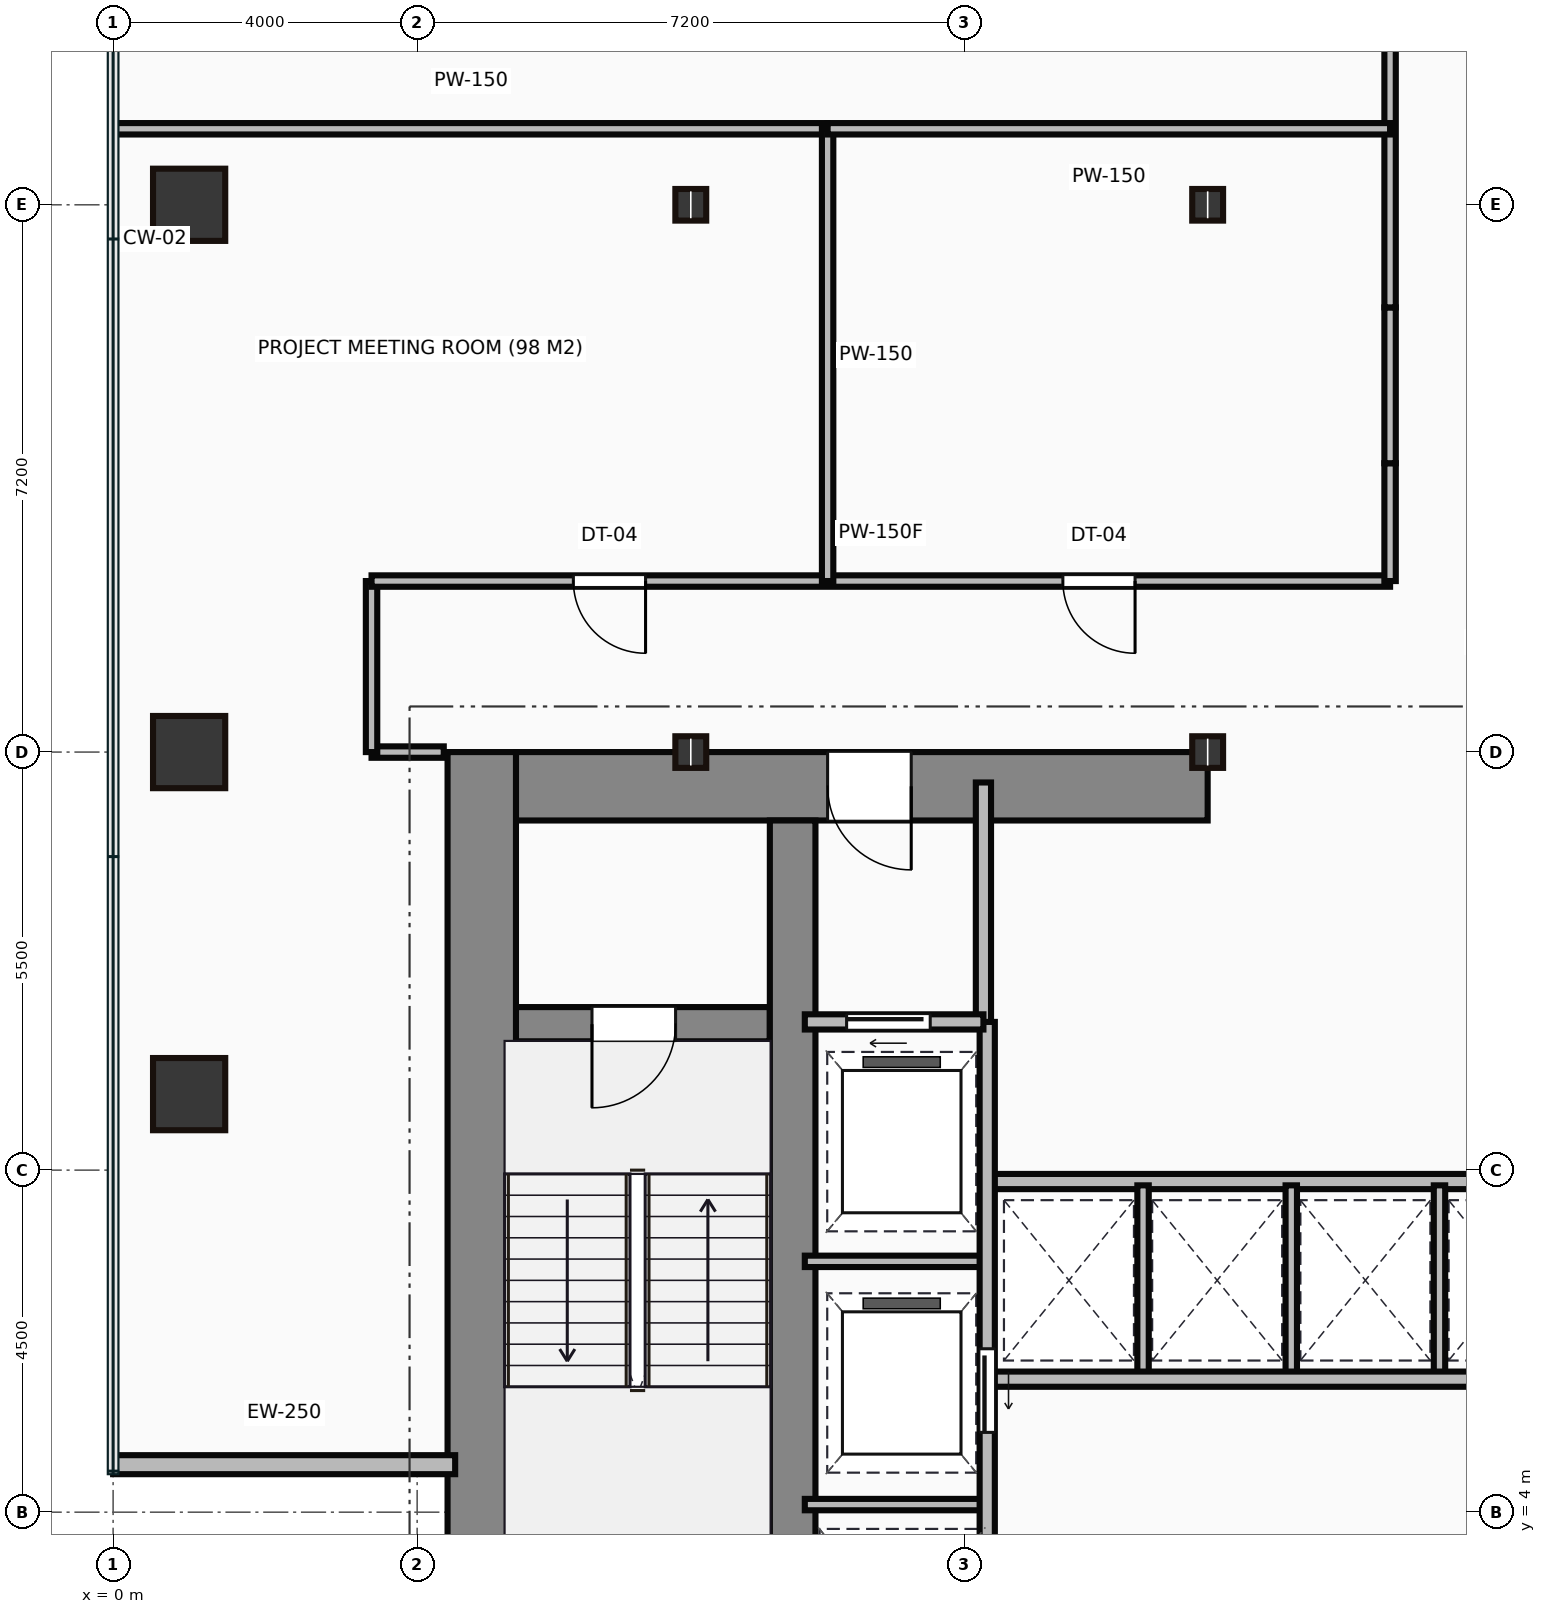
"""IFC4 building model, lengths in metres.
Left out: names, types, materials, properties, quantities, classifications, styles, units other than length and angle.
Written with IfcOpenShell. Run it as: python <this file> out.ifc"""

import sys

from ifc_helpers import new_model, si_unit, direction, frame, frame_2d, origin, origin_2d, place, context, subcontext, project, spatial, rectangle, hollow_rectangle, i_section, extrude, source, transform, mapped, element, fill, save


model = new_model("IFC4")
c1 = context("Model", 3, precision=1e-05, world=origin(), true_north=direction((0.0, 1.0)))
c2 = subcontext(c1, "Body", "Model", "MODEL_VIEW")
j1 = project(units=[si_unit("LENGTHUNIT", "METRE"), si_unit("PLANEANGLEUNIT", "RADIAN")], contexts=[c1])
p1 = place(None, origin())
s1 = spatial("IfcSite", under=j1, at=p1, CompositionType="ELEMENT")
p2 = place(p1, origin())
s2 = spatial("IfcBuilding", under=s1, at=p2, CompositionType="ELEMENT")
p3 = place(p2, frame((0.0, 0.0, 39.8)))
s3 = spatial("IfcBuildingStorey", under=s2, at=p3, CompositionType="ELEMENT", Elevation=39.8)
m1 = source(origin(), c2, "Body", "SweptSolid", [
    extrude(rectangle(XDim=13.1, YDim=0.9, at=frame_2d((6.55, 0.0))), origin(), (0.0, 0.0, 1.0), 3.65),
])
p4 = place(p3, frame((4.85, 0.9, 0.0), z_axis=(0.0, 0.0, 1.0), x_axis=(0.0, 1.0, 0.0)))
e1 = element("IfcWall", 1, at=p4, inside=s3, PredefinedType="SHEAR", context=c2, shape_type="MappedRepresentation", body=[
    mapped(m1, transform((0.0, 0.0, 0.0))),
])
m2 = source(origin(), c2, "Body", "SweptSolid", [
    extrude(rectangle(XDim=9.1, YDim=0.9, at=frame_2d((4.55, 0.0))), origin(), (0.0, 0.0, 1.0), 3.65),
])
p5 = place(p3, frame((5.3, 13.55, 0.0), z_axis=(0.0, 0.0, 1.0), x_axis=(1.0, 0.0, 0.0)))
e2 = element("IfcWall", 2, at=p5, inside=s3, PredefinedType="SHEAR", context=c2, shape_type="MappedRepresentation", body=[
    mapped(m2, transform((0.0, 0.0, 0.0))),
])
p6 = place(p5, frame((4.1, 0.0, 0.0)))
e3 = element("IfcOpeningElement", 3, at=p6, cuts=e2, PredefinedType="OPENING", context=c2, shape_type="SweptSolid", body=[
    extrude(rectangle(XDim=1.1, YDim=2.15, at=frame_2d((0.55, 1.075))), frame((0.0, 0.46, 0.0), z_axis=(0.0, -1.0, 0.0), x_axis=(1.0, 0.0, 0.0)), (0.0, 0.0, 1.0), 0.92),
])
m3 = source(origin(), c2, "Body", "SweptSolid", [
    extrude(rectangle(XDim=12.2, YDim=0.6, at=frame_2d((6.1, 0.0))), origin(), (0.0, 0.0, 1.0), 3.65),
])
p7 = place(p3, frame((8.94, 0.9, 0.0), z_axis=(0.0, 0.0, 1.0), x_axis=(0.0, 1.0, 0.0)))
e4 = element("IfcWall", 4, at=p7, inside=s3, PredefinedType="SHEAR", context=c2, shape_type="MappedRepresentation", body=[
    mapped(m3, transform((0.0, 0.0, 0.0))),
])
m4 = source(origin(), c2, "Body", "SweptSolid", [
    extrude(rectangle(XDim=3.39, YDim=0.45, at=frame_2d((1.695, 0.0))), origin(), (0.0, 0.0, 1.0), 3.65),
])
p8 = place(p3, frame((5.25, 10.42, 0.0), z_axis=(0.0, 0.0, 1.0), x_axis=(1.0, 0.0, 0.0)))
e5 = element("IfcWall", 5, at=p8, inside=s3, PredefinedType="SHEAR", context=c2, shape_type="MappedRepresentation", body=[
    mapped(m4, transform((0.0, 0.0, 0.0))),
])
p9 = place(p8, frame((1.05, 0.0, 0.0)))
e6 = element("IfcOpeningElement", 6, at=p9, cuts=e5, PredefinedType="OPENING", context=c2, shape_type="SweptSolid", body=[
    extrude(rectangle(XDim=1.1, YDim=2.15, at=frame_2d((0.55, 1.075))), frame((0.0, 0.235, 0.0), z_axis=(0.0, -1.0, 0.0), x_axis=(1.0, 0.0, 0.0)), (0.0, 0.0, 1.0), 0.47),
])
m5 = source(origin(), c2, "Body", "SweptSolid", [
    extrude(hollow_rectangle(XDim=0.95, YDim=0.95, WallThickness=0.045, at=origin_2d()), origin(), (0.0, 0.0, 1.0), 3.65),
])
for number, where, z_axis, x_axis in (
    (7, (1.0, 9.5, 0.0), (0.0, 0.0, 1.0), (1.0, 0.0, 0.0)),
    (8, (1.0, 14.0, 0.0), (0.0, 0.0, 1.0), (1.0, 0.0, 0.0)),
    (9, (1.0, 21.2, 0.0), (0.0, 0.0, 1.0), (1.0, 0.0, 0.0)),
):
    element("IfcColumn", number, at=place(p3, frame(where, z_axis=z_axis, x_axis=x_axis)), inside=s3, PredefinedType="COLUMN", context=c2, shape_type="MappedRepresentation", body=[
        mapped(m5, transform((0.0, 0.0, 0.0))),
    ])
m6 = source(origin(), c2, "Body", "SweptSolid", [
    extrude(i_section(OverallWidth=0.406, OverallDepth=0.416, WebThickness=0.03, FlangeThickness=0.048, at=origin_2d()), origin(), (0.0, 0.0, 1.0), 3.65),
])
for number, where, z_axis, x_axis in (
    (10, (7.6, 14.0, 0.0), (0.0, 0.0, 1.0), (1.0, 0.0, 0.0)),
    (11, (7.6, 21.2, 0.0), (0.0, 0.0, 1.0), (1.0, 0.0, 0.0)),
    (12, (14.4, 14.0, 0.0), (0.0, 0.0, 1.0), (1.0, 0.0, 0.0)),
    (13, (14.4, 21.2, 0.0), (0.0, 0.0, 1.0), (1.0, 0.0, 0.0)),
):
    element("IfcColumn", number, at=place(p3, frame(where, z_axis=z_axis, x_axis=x_axis)), inside=s3, PredefinedType="COLUMN", context=c2, shape_type="MappedRepresentation", body=[
        mapped(m6, transform((0.0, 0.0, 0.0))),
    ])
m7 = source(origin(), c2, "Body", "SweptSolid", [
    extrude(rectangle(XDim=4.5, YDim=0.25, at=frame_2d((2.25, 0.0))), origin(), (0.0, 0.0, 1.0), 3.4),
])
p10 = place(p3, frame((0.0, 4.625, 0.0), z_axis=(0.0, 0.0, 1.0), x_axis=(1.0, 0.0, 0.0)))
e14 = element("IfcWall", 14, at=p10, inside=s3, PredefinedType="STANDARD", context=c2, shape_type="MappedRepresentation", body=[
    mapped(m7, transform((0.0, 0.0, 0.0))),
])
m8 = source(origin(), c2, "Body", "SweptSolid", [
    extrude(rectangle(XDim=3.18, YDim=0.2, at=frame_2d((1.59, 0.0))), origin(), (0.0, 0.0, 1.0), 3.4),
])
p11 = place(p3, frame((11.45, 10.42, 0.0), z_axis=(0.0, 0.0, 1.0), x_axis=(0.0, 1.0, 0.0)))
e15 = element("IfcWall", 15, at=p11, inside=s3, PredefinedType="PARTITIONING", context=c2, shape_type="MappedRepresentation", body=[
    mapped(m8, transform((0.0, 0.0, 0.0))),
])
m9 = source(origin(), c2, "Body", "SweptSolid", [
    extrude(rectangle(XDim=2.35, YDim=0.2, at=frame_2d((1.175, 0.0))), origin(), (0.0, 0.0, 1.0), 3.4),
])
p12 = place(p3, frame((9.1, 10.45, 0.0), z_axis=(0.0, 0.0, 1.0), x_axis=(1.0, 0.0, 0.0)))
e16 = element("IfcWall", 16, at=p12, inside=s3, PredefinedType="PARTITIONING", context=c2, shape_type="MappedRepresentation", body=[
    mapped(m9, transform((0.0, 0.0, 0.0))),
])
p13 = place(p12, frame((0.55, 0.0, 0.0)))
e17 = element("IfcOpeningElement", 17, at=p13, cuts=e16, PredefinedType="OPENING", context=c2, shape_type="SweptSolid", body=[
    extrude(rectangle(XDim=1.1, YDim=2.15, at=frame_2d((0.55, 1.075))), frame((0.0, 0.11, 0.0), z_axis=(0.0, -1.0, 0.0), x_axis=(1.0, 0.0, 0.0)), (0.0, 0.0, 1.0), 0.22),
])
m10 = source(origin(), c2, "Body", "SweptSolid", [
    extrude(rectangle(XDim=9.6, YDim=0.2, at=frame_2d((4.8, 0.0))), origin(), (0.0, 0.0, 1.0), 3.4),
])
p14 = place(p3, frame((11.5, 0.85, 0.0), z_axis=(0.0, 0.0, 1.0), x_axis=(0.0, 1.0, 0.0)))
e18 = element("IfcWall", 18, at=p14, inside=s3, PredefinedType="PARTITIONING", context=c2, shape_type="MappedRepresentation", body=[
    mapped(m10, transform((0.0, 0.0, 0.0))),
])
p15 = place(p14, frame((4.2, 0.0, 0.0)))
e19 = element("IfcOpeningElement", 19, at=p15, cuts=e18, PredefinedType="OPENING", context=c2, shape_type="SweptSolid", body=[
    extrude(rectangle(XDim=1.1, YDim=2.15, at=frame_2d((0.55, 1.075))), frame((0.0, 0.11, 0.0), z_axis=(0.0, -1.0, 0.0), x_axis=(1.0, 0.0, 0.0)), (0.0, 0.0, 1.0), 0.22),
])
p16 = place(p14, frame((0.9, 0.0, 0.0)))
e20 = element("IfcOpeningElement", 20, at=p16, cuts=e18, PredefinedType="OPENING", context=c2, shape_type="SweptSolid", body=[
    extrude(rectangle(XDim=1.2, YDim=2.15, at=frame_2d((0.6, 1.075))), frame((0.0, 0.11, 0.0), z_axis=(0.0, -1.0, 0.0), x_axis=(1.0, 0.0, 0.0)), (0.0, 0.0, 1.0), 0.22),
])
m11 = source(origin(), c2, "Body", "SweptSolid", [
    extrude(rectangle(XDim=2.4, YDim=0.15, at=frame_2d((1.2, 0.0))), origin(), (0.0, 0.0, 1.0), 3.4),
])
for number, where, z_axis, x_axis in (
    (21, (9.1, 4.1, 0.0), (0.0, 0.0, 1.0), (1.0, 0.0, 0.0)),
    (22, (9.1, 7.3, 0.0), (0.0, 0.0, 1.0), (1.0, 0.0, 0.0)),
):
    element("IfcWall", number, at=place(p3, frame(where, z_axis=z_axis, x_axis=x_axis)), inside=s3, PredefinedType="PARTITIONING", context=c2, shape_type="MappedRepresentation", body=[
        mapped(m11, transform((0.0, 0.0, 0.0))),
    ])
m12 = source(origin(), c2, "Body", "SweptSolid", [
    extrude(rectangle(XDim=11.85, YDim=0.2, at=frame_2d((5.925, 0.0))), origin(), (0.0, 0.0, 1.0), 3.4),
])
for number, where, z_axis, x_axis in (
    (23, (11.55, 5.75, 0.0), (0.0, 0.0, 1.0), (1.0, 0.0, 0.0)),
    (24, (11.55, 8.35, 0.0), (0.0, 0.0, 1.0), (1.0, 0.0, 0.0)),
):
    element("IfcWall", number, at=place(p3, frame(where, z_axis=z_axis, x_axis=x_axis)), inside=s3, PredefinedType="PARTITIONING", context=c2, shape_type="MappedRepresentation", body=[
        mapped(m12, transform((0.0, 0.0, 0.0))),
    ])
m13 = source(origin(), c2, "Body", "SweptSolid", [
    extrude(rectangle(XDim=2.5, YDim=0.15, at=frame_2d((1.25, 0.0))), origin(), (0.0, 0.0, 1.0), 3.4),
])
for number, where, z_axis, x_axis in (
    (25, (13.55, 5.8, 0.0), (0.0, 0.0, 1.0), (0.0, 1.0, 0.0)),
    (26, (15.5, 5.8, 0.0), (0.0, 0.0, 1.0), (0.0, 1.0, 0.0)),
    (27, (17.45, 5.8, 0.0), (0.0, 0.0, 1.0), (0.0, 1.0, 0.0)),
):
    element("IfcWall", number, at=place(p3, frame(where, z_axis=z_axis, x_axis=x_axis)), inside=s3, PredefinedType="PARTITIONING", context=c2, shape_type="MappedRepresentation", body=[
        mapped(m13, transform((0.0, 0.0, 0.0))),
    ])
m14 = source(origin(), c2, "Body", "SweptSolid", [
    extrude(rectangle(XDim=0.95, YDim=0.15, at=frame_2d((0.475, 0.0))), origin(), (0.0, 0.0, 1.0), 2.625),
])
p17 = place(p3, frame((4.35, 14.0, 0.0), z_axis=(0.0, 0.0, 1.0), x_axis=(-1.0, 0.0, 0.0)))
e28 = element("IfcWall", 28, at=p17, inside=s3, PredefinedType="PARTITIONING", context=c2, shape_type="MappedRepresentation", body=[
    mapped(m14, transform((0.0, 0.0, 0.0))),
])
m15 = source(origin(), c2, "Body", "SweptSolid", [
    extrude(rectangle(XDim=2.25, YDim=0.15, at=frame_2d((1.125, 0.0))), origin(), (0.0, 0.0, 1.0), 3.4),
])
p18 = place(p3, frame((3.4, 14.0, 0.0), z_axis=(0.0, 0.0, 1.0), x_axis=(0.0, 1.0, 0.0)))
e29 = element("IfcWall", 29, at=p18, inside=s3, PredefinedType="PARTITIONING", context=c2, shape_type="MappedRepresentation", body=[
    mapped(m15, transform((0.0, 0.0, 0.0))),
])
m16 = source(origin(), c2, "Body", "SweptSolid", [
    extrude(rectangle(XDim=13.4, YDim=0.15, at=frame_2d((6.7, 0.0))), origin(), (0.0, 0.0, 1.0), 3.4),
])
p19 = place(p3, frame((3.4, 16.25, 0.0), z_axis=(0.0, 0.0, 1.0), x_axis=(1.0, 0.0, 0.0)))
e30 = element("IfcWall", 30, at=p19, inside=s3, PredefinedType="PARTITIONING", context=c2, shape_type="MappedRepresentation", body=[
    mapped(m16, transform((0.0, 0.0, 0.0))),
])
p20 = place(p19, frame((2.655, 0.0, 0.0)))
e31 = element("IfcOpeningElement", 31, at=p20, cuts=e30, PredefinedType="OPENING", context=c2, shape_type="SweptSolid", body=[
    extrude(rectangle(XDim=0.95, YDim=2.15, at=frame_2d((0.475, 1.075))), frame((0.0, 0.085, 0.0), z_axis=(0.0, -1.0, 0.0), x_axis=(1.0, 0.0, 0.0)), (0.0, 0.0, 1.0), 0.17),
])
p21 = place(p19, frame((9.095, 0.0, 0.0)))
e32 = element("IfcOpeningElement", 32, at=p21, cuts=e30, PredefinedType="OPENING", context=c2, shape_type="SweptSolid", body=[
    extrude(rectangle(XDim=0.95, YDim=2.15, at=frame_2d((0.475, 1.075))), frame((0.0, 0.085, 0.0), z_axis=(0.0, -1.0, 0.0), x_axis=(1.0, 0.0, 0.0)), (0.0, 0.0, 1.0), 0.17),
])
m17 = source(origin(), c2, "Body", "SweptSolid", [
    extrude(rectangle(XDim=1.55, YDim=0.15, at=frame_2d((0.775, 0.0))), origin(), (0.0, 0.0, 1.0), 3.4),
])
p22 = place(p3, frame((16.8, 16.25, 0.0), z_axis=(0.0, 0.0, 1.0), x_axis=(0.0, 1.0, 0.0)))
e33 = element("IfcWall", 33, at=p22, inside=s3, PredefinedType="PARTITIONING", context=c2, shape_type="MappedRepresentation", body=[
    mapped(m17, transform((0.0, 0.0, 0.0))),
])
m18 = source(origin(), c2, "Body", "SweptSolid", [
    extrude(rectangle(XDim=2.05, YDim=0.15, at=frame_2d((1.025, 0.0))), origin(), (0.0, 0.0, 1.0), 3.4),
])
p23 = place(p3, frame((16.8, 17.8, 0.0), z_axis=(0.0, 0.0, 1.0), x_axis=(0.0, 1.0, 0.0)))
e34 = element("IfcWall", 34, at=p23, inside=s3, PredefinedType="PARTITIONING", context=c2, shape_type="MappedRepresentation", body=[
    mapped(m18, transform((0.0, 0.0, 0.0))),
])
m19 = source(origin(), c2, "Body", "SweptSolid", [
    extrude(rectangle(XDim=16.15, YDim=0.15, at=frame_2d((8.075, 0.0))), origin(), (0.0, 0.0, 1.0), 3.4),
])
p24 = place(p3, frame((16.8, 19.85, 0.0), z_axis=(0.0, 0.0, 1.0), x_axis=(0.0, 1.0, 0.0)))
e35 = element("IfcWall", 35, at=p24, inside=s3, PredefinedType="PARTITIONING", context=c2, shape_type="MappedRepresentation", body=[
    mapped(m19, transform((0.0, 0.0, 0.0))),
])
p25 = place(p24, frame((7.075, 0.0, 0.0)))
e36 = element("IfcOpeningElement", 36, at=p25, cuts=e35, PredefinedType="OPENING", context=c2, shape_type="SweptSolid", body=[
    extrude(rectangle(XDim=0.95, YDim=2.15, at=frame_2d((0.475, 1.075))), frame((0.0, 0.085, 0.0), z_axis=(0.0, -1.0, 0.0), x_axis=(1.0, 0.0, 0.0)), (0.0, 0.0, 1.0), 0.17),
])
p26 = place(p24, frame((13.845, 0.0, 0.0)))
e37 = element("IfcOpeningElement", 37, at=p26, cuts=e35, PredefinedType="OPENING", context=c2, shape_type="SweptSolid", body=[
    extrude(rectangle(XDim=0.95, YDim=2.15, at=frame_2d((0.475, 1.075))), frame((0.0, 0.085, 0.0), z_axis=(0.0, -1.0, 0.0), x_axis=(1.0, 0.0, 0.0)), (0.0, 0.0, 1.0), 0.17),
])
m20 = source(origin(), c2, "Body", "SweptSolid", [
    extrude(rectangle(XDim=9.38, YDim=0.15, at=frame_2d((4.69, 0.0))), origin(), (0.0, 0.0, 1.0), 3.4),
])
p27 = place(p3, frame((0.02, 22.2, 0.0), z_axis=(0.0, 0.0, 1.0), x_axis=(1.0, 0.0, 0.0)))
e38 = element("IfcWall", 38, at=p27, inside=s3, PredefinedType="PARTITIONING", context=c2, shape_type="MappedRepresentation", body=[
    mapped(m20, transform((0.0, 0.0, 0.0))),
])
m21 = source(origin(), c2, "Body", "SweptSolid", [
    extrude(rectangle(XDim=5.95, YDim=0.15, at=frame_2d((2.975, 0.0))), origin(), (0.0, 0.0, 1.0), 3.4),
])
p28 = place(p3, frame((9.4, 22.2, 0.0), z_axis=(0.0, 0.0, 1.0), x_axis=(0.0, -1.0, 0.0)))
e39 = element("IfcWall", 39, at=p28, inside=s3, PredefinedType="PARTITIONING", context=c2, shape_type="MappedRepresentation", body=[
    mapped(m21, transform((0.0, 0.0, 0.0))),
])
m22 = source(origin(), c2, "Body", "SweptSolid", [
    extrude(rectangle(XDim=7.4, YDim=0.15, at=frame_2d((3.7, 0.0))), origin(), (0.0, 0.0, 1.0), 3.4),
])
p29 = place(p3, frame((16.8, 22.2, 0.0), z_axis=(0.0, 0.0, 1.0), x_axis=(-1.0, 0.0, 0.0)))
e40 = element("IfcWall", 40, at=p29, inside=s3, PredefinedType="PARTITIONING", context=c2, shape_type="MappedRepresentation", body=[
    mapped(m22, transform((0.0, 0.0, 0.0))),
])
m23 = source(origin(), c2, "Body", "SweptSolid", [
    extrude(rectangle(XDim=1.1, YDim=2.15, at=frame_2d((0.55, 1.075))), frame((0.0, 0.025, 0.0), z_axis=(0.0, -1.0, 0.0), x_axis=(1.0, 0.0, 0.0)), (0.0, 0.0, 1.0), 0.05),
])
p30 = place(p9, frame((1.1, 0.0, 0.0), z_axis=(0.0, 0.0, 1.0), x_axis=(-1.0, 0.0, 0.0)))
e41 = element("IfcDoor", 41, at=p30, inside=s3, OperationType="SINGLE_SWING_LEFT", PredefinedType="DOOR", context=c2, shape_type="MappedRepresentation", body=[
    mapped(m23, transform((0.0, 0.0, 0.0))),
])
fill(e6, e41)
p31 = place(p6, origin())
e42 = element("IfcDoor", 42, at=p31, inside=s3, OperationType="SINGLE_SWING_RIGHT", PredefinedType="DOOR", context=c2, shape_type="MappedRepresentation", body=[
    mapped(m23, transform((0.0, 0.0, 0.0))),
])
fill(e3, e42)
p32 = place(p13, origin())
e43 = element("IfcDoor", 43, at=p32, inside=s3, OperationType="SLIDING_TO_LEFT", PredefinedType="DOOR", context=c2, shape_type="MappedRepresentation", body=[
    mapped(m23, transform((0.0, 0.0, 0.0))),
])
fill(e17, e43)
p33 = place(p15, frame((1.1, 0.0, 0.0), z_axis=(0.0, 0.0, 1.0), x_axis=(-1.0, 0.0, 0.0)))
e44 = element("IfcDoor", 44, at=p33, inside=s3, OperationType="SLIDING_TO_LEFT", PredefinedType="DOOR", context=c2, shape_type="MappedRepresentation", body=[
    mapped(m23, transform((0.0, 0.0, 0.0))),
])
fill(e19, e44)
m24 = source(origin(), c2, "Body", "SweptSolid", [
    extrude(rectangle(XDim=0.95, YDim=2.15, at=frame_2d((0.475, 1.075))), frame((0.0, 0.025, 0.0), z_axis=(0.0, -1.0, 0.0), x_axis=(1.0, 0.0, 0.0)), (0.0, 0.0, 1.0), 0.05),
])
p34 = place(p20, origin())
e45 = element("IfcDoor", 45, at=p34, inside=s3, OperationType="SINGLE_SWING_RIGHT", PredefinedType="DOOR", context=c2, shape_type="MappedRepresentation", body=[
    mapped(m24, transform((0.0, 0.0, 0.0))),
])
fill(e31, e45)
p35 = place(p21, origin())
e46 = element("IfcDoor", 46, at=p35, inside=s3, OperationType="SINGLE_SWING_RIGHT", PredefinedType="DOOR", context=c2, shape_type="MappedRepresentation", body=[
    mapped(m24, transform((0.0, 0.0, 0.0))),
])
fill(e32, e46)
save(model, sys.argv[1])
